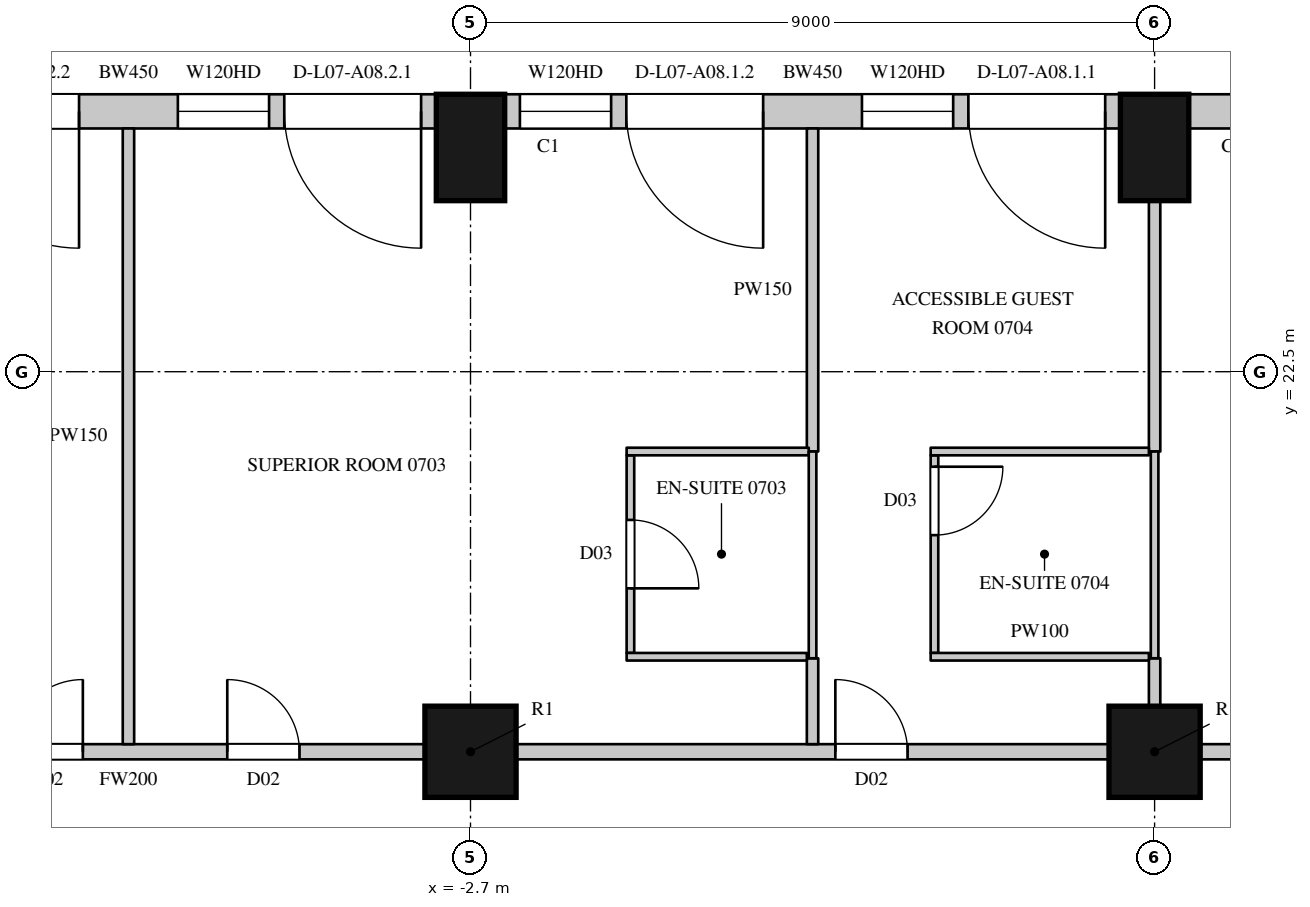
"""IFC4 building model, lengths in metres.
Left out: names, types, materials, properties, quantities, classifications, styles, units other than length and angle.
Written with IfcOpenShell. Run it as: python <this file> out.ifc"""

import sys

from ifc_helpers import new_model, si_unit, direction, frame, frame_2d, origin, origin_2d, place, context, subcontext, project, spatial, rectangle, circle, extrude, element, fill, save


model = new_model("IFC4")
c1 = context("Model", 3, precision=1e-05, world=origin(), true_north=direction((0.0, 1.0)))
c2 = subcontext(c1, "Body", "Model", "MODEL_VIEW")
j1 = project(units=[si_unit("LENGTHUNIT", "METRE"), si_unit("PLANEANGLEUNIT", "RADIAN")], contexts=[c1])
p1 = place(None, origin())
s1 = spatial("IfcSite", under=j1, at=p1, CompositionType="ELEMENT")
p2 = place(p1, origin())
s2 = spatial("IfcBuilding", under=s1, at=p2, CompositionType="ELEMENT")
p3 = place(p2, frame((0.0, 0.0, 55.5)))
s3 = spatial("IfcBuildingStorey", under=s2, at=p3, CompositionType="ELEMENT", Elevation=55.5)
for number, where, z_axis, x_axis in (
    (1, (6.3, 25.45, 0.0), (0.0, 0.0, 1.0), (-1.0, 0.0, 0.0)),
    (2, (-2.7, 25.45, 0.0), (0.0, 0.0, 1.0), (-1.0, 0.0, 0.0)),
):
    element("IfcColumn", number, at=place(p3, frame(where, z_axis=z_axis, x_axis=x_axis)), inside=s3, PredefinedType="COLUMN", context=c2, shape_type="SweptSolid", body=[
        extrude(rectangle(XDim=0.9, YDim=1.4, at=origin_2d()), origin(), (0.0, 0.0, 1.0), 3.6),
    ])
for number, where, z_axis, x_axis in (
    (3, (-2.7, 17.5, 0.0), (0.0, 0.0, 1.0), (1.0, 0.0, 0.0)),
    (4, (6.3, 17.5, 0.0), (0.0, 0.0, 1.0), (1.0, 0.0, 0.0)),
):
    element("IfcColumn", number, at=place(p3, frame(where, z_axis=z_axis, x_axis=x_axis)), inside=s3, PredefinedType="COLUMN", context=c2, shape_type="SweptSolid", body=[
        extrude(circle(Radius=0.6, at=origin_2d()), origin(), (0.0, 0.0, 1.0), 3.6),
    ])
p4 = place(p3, frame((11.989, 25.925, 0.0), z_axis=(0.0, 0.0, 1.0), x_axis=(-1.0, 0.0, 0.0)))
e5 = element("IfcWall", 5, at=p4, inside=s3, PredefinedType="SOLIDWALL", context=c2, shape_type="SweptSolid", body=[
    extrude(rectangle(XDim=5.239, YDim=0.45, at=frame_2d((2.619, 0.0))), origin(), (0.0, 0.0, 1.0), 3.3),
])
p5 = place(p4, frame((1.77, 0.0, 1.05)))
e6 = element("IfcOpeningElement", 6, at=p5, cuts=e5, PredefinedType="OPENING", context=c2, shape_type="SweptSolid", body=[
    extrude(rectangle(XDim=2.1, YDim=2.0, at=frame_2d((1.05, 1.0))), frame((0.0, 0.235, 0.0), z_axis=(0.0, -1.0, 0.0), x_axis=(1.0, 0.0, 0.0)), (0.0, 0.0, 1.0), 0.47),
])
p6 = place(p3, frame((5.85, 25.925, 0.0), z_axis=(0.0, 0.0, 1.0), x_axis=(-1.0, 0.0, 0.0)))
e7 = element("IfcWall", 7, at=p6, inside=s3, PredefinedType="SOLIDWALL", context=c2, shape_type="SweptSolid", body=[
    extrude(rectangle(XDim=8.1, YDim=0.45, at=frame_2d((4.05, 0.0))), origin(), (0.0, 0.0, 1.0), 3.3),
])
p7 = place(p6, frame((0.2, 0.0, 0.0)))
e8 = element("IfcOpeningElement", 8, at=p7, cuts=e7, PredefinedType="OPENING", context=c2, shape_type="SweptSolid", body=[
    extrude(rectangle(XDim=1.8, YDim=2.4, at=frame_2d((0.9, 1.2))), frame((0.0, 0.235, 0.0), z_axis=(0.0, -1.0, 0.0), x_axis=(1.0, 0.0, 0.0)), (0.0, 0.0, 1.0), 0.47),
])
p8 = place(p6, frame((2.2, 0.0, 1.05)))
e9 = element("IfcOpeningElement", 9, at=p8, cuts=e7, PredefinedType="OPENING", context=c2, shape_type="SweptSolid", body=[
    extrude(rectangle(XDim=1.2, YDim=2.0, at=frame_2d((0.6, 1.0))), frame((0.0, 0.235, 0.0), z_axis=(0.0, -1.0, 0.0), x_axis=(1.0, 0.0, 0.0)), (0.0, 0.0, 1.0), 0.47),
])
p9 = place(p6, frame((4.7, 0.0, 0.0)))
e10 = element("IfcOpeningElement", 10, at=p9, cuts=e7, PredefinedType="OPENING", context=c2, shape_type="SweptSolid", body=[
    extrude(rectangle(XDim=1.8, YDim=2.4, at=frame_2d((0.9, 1.2))), frame((0.0, 0.235, 0.0), z_axis=(0.0, -1.0, 0.0), x_axis=(1.0, 0.0, 0.0)), (0.0, 0.0, 1.0), 0.47),
])
p10 = place(p6, frame((6.7, 0.0, 1.05)))
e11 = element("IfcOpeningElement", 11, at=p10, cuts=e7, PredefinedType="OPENING", context=c2, shape_type="SweptSolid", body=[
    extrude(rectangle(XDim=1.2, YDim=2.0, at=frame_2d((0.6, 1.0))), frame((0.0, 0.235, 0.0), z_axis=(0.0, -1.0, 0.0), x_axis=(1.0, 0.0, 0.0)), (0.0, 0.0, 1.0), 0.47),
])
p11 = place(p3, frame((-3.15, 25.925, 0.0), z_axis=(0.0, 0.0, 1.0), x_axis=(-1.0, 0.0, 0.0)))
e12 = element("IfcWall", 12, at=p11, inside=s3, PredefinedType="SOLIDWALL", context=c2, shape_type="SweptSolid", body=[
    extrude(rectangle(XDim=8.1, YDim=0.45, at=frame_2d((4.05, 0.0))), origin(), (0.0, 0.0, 1.0), 3.3),
])
p12 = place(p11, frame((0.2, 0.0, 0.0)))
e13 = element("IfcOpeningElement", 13, at=p12, cuts=e12, PredefinedType="OPENING", context=c2, shape_type="SweptSolid", body=[
    extrude(rectangle(XDim=1.8, YDim=2.4, at=frame_2d((0.9, 1.2))), frame((0.0, 0.235, 0.0), z_axis=(0.0, -1.0, 0.0), x_axis=(1.0, 0.0, 0.0)), (0.0, 0.0, 1.0), 0.47),
])
p13 = place(p11, frame((2.2, 0.0, 1.05)))
e14 = element("IfcOpeningElement", 14, at=p13, cuts=e12, PredefinedType="OPENING", context=c2, shape_type="SweptSolid", body=[
    extrude(rectangle(XDim=1.2, YDim=2.0, at=frame_2d((0.6, 1.0))), frame((0.0, 0.235, 0.0), z_axis=(0.0, -1.0, 0.0), x_axis=(1.0, 0.0, 0.0)), (0.0, 0.0, 1.0), 0.47),
])
p14 = place(p11, frame((4.7, 0.0, 0.0)))
e15 = element("IfcOpeningElement", 15, at=p14, cuts=e12, PredefinedType="OPENING", context=c2, shape_type="SweptSolid", body=[
    extrude(rectangle(XDim=1.8, YDim=2.4, at=frame_2d((0.9, 1.2))), frame((0.0, 0.235, 0.0), z_axis=(0.0, -1.0, 0.0), x_axis=(1.0, 0.0, 0.0)), (0.0, 0.0, 1.0), 0.47),
])
p15 = place(p11, frame((6.7, 0.0, 1.05)))
e16 = element("IfcOpeningElement", 16, at=p15, cuts=e12, PredefinedType="OPENING", context=c2, shape_type="SweptSolid", body=[
    extrude(rectangle(XDim=1.2, YDim=2.0, at=frame_2d((0.6, 1.0))), frame((0.0, 0.235, 0.0), z_axis=(0.0, -1.0, 0.0), x_axis=(1.0, 0.0, 0.0)), (0.0, 0.0, 1.0), 0.47),
])
p16 = place(p3, frame((-11.1, 17.5, 0.0), z_axis=(0.0, 0.0, 1.0), x_axis=(1.0, 0.0, 0.0)))
e17 = element("IfcWall", 17, at=p16, inside=s3, PredefinedType="PARTITIONING", context=c2, shape_type="SweptSolid", body=[
    extrude(rectangle(XDim=7.8, YDim=0.2, at=frame_2d((3.9, 0.0))), origin(), (0.0, 0.0, 1.0), 2.75),
])
p17 = place(p16, frame((2.35, 0.0, 0.0)))
e18 = element("IfcOpeningElement", 18, at=p17, cuts=e17, PredefinedType="OPENING", context=c2, shape_type="SweptSolid", body=[
    extrude(rectangle(XDim=0.95, YDim=2.2, at=frame_2d((0.475, 1.1))), frame((0.0, 0.11, 0.0), z_axis=(0.0, -1.0, 0.0), x_axis=(1.0, 0.0, 0.0)), (0.0, 0.0, 1.0), 0.22),
])
p18 = place(p16, frame((5.2, 0.0, 0.0)))
e19 = element("IfcOpeningElement", 19, at=p18, cuts=e17, PredefinedType="OPENING", context=c2, shape_type="SweptSolid", body=[
    extrude(rectangle(XDim=0.95, YDim=2.2, at=frame_2d((0.475, 1.1))), frame((0.0, 0.11, 0.0), z_axis=(0.0, -1.0, 0.0), x_axis=(1.0, 0.0, 0.0)), (0.0, 0.0, 1.0), 0.22),
])
p19 = place(p3, frame((-2.1, 17.5, 0.0), z_axis=(0.0, 0.0, 1.0), x_axis=(1.0, 0.0, 0.0)))
e20 = element("IfcWall", 20, at=p19, inside=s3, PredefinedType="PARTITIONING", context=c2, shape_type="SweptSolid", body=[
    extrude(rectangle(XDim=7.8, YDim=0.2, at=frame_2d((3.9, 0.0))), origin(), (0.0, 0.0, 1.0), 2.75),
])
p20 = place(p19, frame((4.2, 0.0, 0.0)))
e21 = element("IfcOpeningElement", 21, at=p20, cuts=e20, PredefinedType="OPENING", context=c2, shape_type="SweptSolid", body=[
    extrude(rectangle(XDim=0.95, YDim=2.2, at=frame_2d((0.475, 1.1))), frame((0.0, 0.11, 0.0), z_axis=(0.0, -1.0, 0.0), x_axis=(1.0, 0.0, 0.0)), (0.0, 0.0, 1.0), 0.22),
])
p21 = place(p3, frame((6.9, 17.5, 0.0), z_axis=(0.0, 0.0, 1.0), x_axis=(1.0, 0.0, 0.0)))
e22 = element("IfcWall", 22, at=p21, inside=s3, PredefinedType="PARTITIONING", context=c2, shape_type="SweptSolid", body=[
    extrude(rectangle(XDim=7.8, YDim=0.2, at=frame_2d((3.9, 0.0))), origin(), (0.0, 0.0, 1.0), 2.75),
])
p22 = place(p21, frame((1.45, 0.0, 0.0)))
e23 = element("IfcOpeningElement", 23, at=p22, cuts=e22, PredefinedType="OPENING", context=c2, shape_type="SweptSolid", body=[
    extrude(rectangle(XDim=1.1, YDim=2.4, at=frame_2d((0.55, 1.2))), frame((0.0, 0.11, 0.0), z_axis=(0.0, -1.0, 0.0), x_axis=(1.0, 0.0, 0.0)), (0.0, 0.0, 1.0), 0.22),
])
p23 = place(p3, frame((-7.2, 17.6, 0.0), z_axis=(0.0, 0.0, 1.0), x_axis=(0.0, 1.0, 0.0)))
e24 = element("IfcWall", 24, at=p23, inside=s3, PredefinedType="PARTITIONING", context=c2, shape_type="SweptSolid", body=[
    extrude(rectangle(XDim=8.1, YDim=0.15, at=frame_2d((4.05, 0.0))), origin(), (0.0, 0.0, 1.0), 2.65),
])
p24 = place(p3, frame((1.8, 17.6, 0.0), z_axis=(0.0, 0.0, 1.0), x_axis=(0.0, 1.0, 0.0)))
e25 = element("IfcWall", 25, at=p24, inside=s3, PredefinedType="PARTITIONING", context=c2, shape_type="SweptSolid", body=[
    extrude(rectangle(XDim=1.13, YDim=0.15, at=frame_2d((0.565, 0.0))), origin(), (0.0, 0.0, 1.0), 2.65),
])
p25 = place(p3, frame((1.8, 21.45, 0.0), z_axis=(0.0, 0.0, 1.0), x_axis=(0.0, 1.0, 0.0)))
e26 = element("IfcWall", 26, at=p25, inside=s3, PredefinedType="PARTITIONING", context=c2, shape_type="SweptSolid", body=[
    extrude(rectangle(XDim=4.25, YDim=0.15, at=frame_2d((2.125, 0.0))), origin(), (0.0, 0.0, 1.0), 2.65),
])
p26 = place(p3, frame((6.3, 18.1, 0.0), z_axis=(0.0, 0.0, 1.0), x_axis=(0.0, 1.0, 0.0)))
e27 = element("IfcWall", 27, at=p26, inside=s3, PredefinedType="PARTITIONING", context=c2, shape_type="SweptSolid", body=[
    extrude(rectangle(XDim=0.63, YDim=0.15, at=frame_2d((0.315, 0.0))), origin(), (0.0, 0.0, 1.0), 2.75),
])
p27 = place(p3, frame((6.3, 21.45, 0.0), z_axis=(0.0, 0.0, 1.0), x_axis=(0.0, 1.0, 0.0)))
e28 = element("IfcWall", 28, at=p27, inside=s3, PredefinedType="PARTITIONING", context=c2, shape_type="SweptSolid", body=[
    extrude(rectangle(XDim=3.3, YDim=0.15, at=frame_2d((1.65, 0.0))), origin(), (0.0, 0.0, 1.0), 2.75),
])
p28 = place(p3, frame((-0.596, 18.8, 0.0), z_axis=(0.0, 0.0, 1.0), x_axis=(0.0, 1.0, 0.0)))
e29 = element("IfcWall", 29, at=p28, inside=s3, PredefinedType="PARTITIONING", context=c2, shape_type="SweptSolid", body=[
    extrude(rectangle(XDim=2.6, YDim=0.1, at=frame_2d((1.3, 0.0))), origin(), (0.0, 0.0, 1.0), 3.3),
])
p29 = place(p28, frame((0.85, 0.0, 0.0)))
e30 = element("IfcOpeningElement", 30, at=p29, cuts=e29, PredefinedType="OPENING", context=c2, shape_type="SweptSolid", body=[
    extrude(rectangle(XDim=0.9, YDim=2.2, at=frame_2d((0.45, 1.1))), frame((0.0, 0.06, 0.0), z_axis=(0.0, -1.0, 0.0), x_axis=(1.0, 0.0, 0.0)), (0.0, 0.0, 1.0), 0.12),
])
p30 = place(p3, frame((-0.646, 18.75, 0.0), z_axis=(0.0, 0.0, 1.0), x_axis=(1.0, 0.0, 0.0)))
e31 = element("IfcWall", 31, at=p30, inside=s3, PredefinedType="PARTITIONING", context=c2, shape_type="SweptSolid", body=[
    extrude(rectangle(XDim=2.371, YDim=0.1, at=frame_2d((1.186, 0.0))), origin(), (0.0, 0.0, 1.0), 3.3),
])
p31 = place(p3, frame((-0.646, 21.45, 0.0), z_axis=(0.0, 0.0, 1.0), x_axis=(1.0, 0.0, 0.0)))
e32 = element("IfcWall", 32, at=p31, inside=s3, PredefinedType="PARTITIONING", context=c2, shape_type="SweptSolid", body=[
    extrude(rectangle(XDim=2.396, YDim=0.1, at=frame_2d((1.198, 0.0))), origin(), (0.0, 0.0, 1.0), 3.3),
])
p32 = place(p3, frame((1.8, 18.73, 0.0), z_axis=(0.0, 0.0, 1.0), x_axis=(0.0, 1.0, 0.0)))
e33 = element("IfcWall", 33, at=p32, inside=s3, PredefinedType="PARTITIONING", context=c2, shape_type="SweptSolid", body=[
    extrude(rectangle(XDim=2.72, YDim=0.1, at=frame_2d((1.36, 0.0))), origin(), (0.0, 0.0, 1.0), 2.65),
])
p33 = place(p3, frame((3.404, 18.8, 0.0), z_axis=(0.0, 0.0, 1.0), x_axis=(0.0, 1.0, 0.0)))
e34 = element("IfcWall", 34, at=p33, inside=s3, PredefinedType="PARTITIONING", context=c2, shape_type="SweptSolid", body=[
    extrude(rectangle(XDim=2.6, YDim=0.1, at=frame_2d((1.3, 0.0))), origin(), (0.0, 0.0, 1.0), 3.3),
])
p34 = place(p33, frame((1.55, 0.0, 0.0)))
e35 = element("IfcOpeningElement", 35, at=p34, cuts=e34, PredefinedType="OPENING", context=c2, shape_type="SweptSolid", body=[
    extrude(rectangle(XDim=0.9, YDim=2.2, at=frame_2d((0.45, 1.1))), frame((0.0, 0.06, 0.0), z_axis=(0.0, -1.0, 0.0), x_axis=(1.0, 0.0, 0.0)), (0.0, 0.0, 1.0), 0.12),
])
for number, where, z_axis, x_axis in (
    (36, (3.354, 18.75, 0.0), (0.0, 0.0, 1.0), (1.0, 0.0, 0.0)),
    (37, (3.354, 21.45, 0.0), (0.0, 0.0, 1.0), (1.0, 0.0, 0.0)),
):
    element("IfcWall", number, at=place(p3, frame(where, z_axis=z_axis, x_axis=x_axis)), inside=s3, PredefinedType="PARTITIONING", context=c2, shape_type="SweptSolid", body=[
        extrude(rectangle(XDim=2.871, YDim=0.1, at=frame_2d((1.436, 0.0))), origin(), (0.0, 0.0, 1.0), 3.3),
    ])
p35 = place(p3, frame((6.3, 18.73, 0.0), z_axis=(0.0, 0.0, 1.0), x_axis=(0.0, 1.0, 0.0)))
e38 = element("IfcWall", 38, at=p35, inside=s3, PredefinedType="PARTITIONING", context=c2, shape_type="SweptSolid", body=[
    extrude(rectangle(XDim=2.72, YDim=0.1, at=frame_2d((1.36, 0.0))), origin(), (0.0, 0.0, 1.0), 2.75),
])
p36 = place(p7, origin())
e39 = element("IfcDoor", 39, at=p36, inside=s3, OperationType="SLIDING_TO_LEFT", PredefinedType="DOOR", context=c2, shape_type="SweptSolid", body=[
    extrude(rectangle(XDim=1.8, YDim=2.4, at=frame_2d((0.9, 1.2))), frame((0.0, 0.13, 0.0), z_axis=(0.0, -1.0, 0.0), x_axis=(1.0, 0.0, 0.0)), (0.0, 0.0, 1.0), 0.05),
])
fill(e8, e39)
p37 = place(p8, origin())
e40 = element("IfcWindow", 40, at=p37, inside=s3, PartitioningType="SINGLE_PANEL", PredefinedType="WINDOW", context=c2, shape_type="SweptSolid", body=[
    extrude(rectangle(XDim=1.2, YDim=2.0, at=frame_2d((0.6, 1.0))), frame((0.0, 0.135, 0.0), z_axis=(0.0, -1.0, 0.0), x_axis=(1.0, 0.0, 0.0)), (0.0, 0.0, 1.0), 0.06),
])
fill(e9, e40)
p38 = place(p9, origin())
e41 = element("IfcDoor", 41, at=p38, inside=s3, OperationType="SLIDING_TO_LEFT", PredefinedType="DOOR", context=c2, shape_type="SweptSolid", body=[
    extrude(rectangle(XDim=1.8, YDim=2.4, at=frame_2d((0.9, 1.2))), frame((0.0, 0.13, 0.0), z_axis=(0.0, -1.0, 0.0), x_axis=(1.0, 0.0, 0.0)), (0.0, 0.0, 1.0), 0.05),
])
fill(e10, e41)
p39 = place(p10, origin())
e42 = element("IfcWindow", 42, at=p39, inside=s3, PartitioningType="SINGLE_PANEL", PredefinedType="WINDOW", context=c2, shape_type="SweptSolid", body=[
    extrude(rectangle(XDim=1.2, YDim=2.0, at=frame_2d((0.6, 1.0))), frame((0.0, 0.135, 0.0), z_axis=(0.0, -1.0, 0.0), x_axis=(1.0, 0.0, 0.0)), (0.0, 0.0, 1.0), 0.06),
])
fill(e11, e42)
p40 = place(p12, origin())
e43 = element("IfcDoor", 43, at=p40, inside=s3, OperationType="SLIDING_TO_LEFT", PredefinedType="DOOR", context=c2, shape_type="SweptSolid", body=[
    extrude(rectangle(XDim=1.8, YDim=2.4, at=frame_2d((0.9, 1.2))), frame((0.0, 0.13, 0.0), z_axis=(0.0, -1.0, 0.0), x_axis=(1.0, 0.0, 0.0)), (0.0, 0.0, 1.0), 0.05),
])
fill(e13, e43)
p41 = place(p13, origin())
e44 = element("IfcWindow", 44, at=p41, inside=s3, PartitioningType="SINGLE_PANEL", PredefinedType="WINDOW", context=c2, shape_type="SweptSolid", body=[
    extrude(rectangle(XDim=1.2, YDim=2.0, at=frame_2d((0.6, 1.0))), frame((0.0, 0.135, 0.0), z_axis=(0.0, -1.0, 0.0), x_axis=(1.0, 0.0, 0.0)), (0.0, 0.0, 1.0), 0.06),
])
fill(e14, e44)
p42 = place(p14, origin())
e45 = element("IfcDoor", 45, at=p42, inside=s3, OperationType="SLIDING_TO_LEFT", PredefinedType="DOOR", context=c2, shape_type="SweptSolid", body=[
    extrude(rectangle(XDim=1.8, YDim=2.4, at=frame_2d((0.9, 1.2))), frame((0.0, 0.13, 0.0), z_axis=(0.0, -1.0, 0.0), x_axis=(1.0, 0.0, 0.0)), (0.0, 0.0, 1.0), 0.05),
])
fill(e15, e45)
p43 = place(p17, origin())
e46 = element("IfcDoor", 46, at=p43, inside=s3, OperationType="SINGLE_SWING_RIGHT", PredefinedType="DOOR", context=c2, shape_type="SweptSolid", body=[
    extrude(rectangle(XDim=0.95, YDim=2.2, at=frame_2d((0.475, 1.1))), frame((0.0, 0.025, 0.0), z_axis=(0.0, -1.0, 0.0), x_axis=(1.0, 0.0, 0.0)), (0.0, 0.0, 1.0), 0.05),
])
fill(e18, e46)
p44 = place(p18, origin())
e47 = element("IfcDoor", 47, at=p44, inside=s3, OperationType="SINGLE_SWING_LEFT", PredefinedType="DOOR", context=c2, shape_type="SweptSolid", body=[
    extrude(rectangle(XDim=0.95, YDim=2.2, at=frame_2d((0.475, 1.1))), frame((0.0, 0.025, 0.0), z_axis=(0.0, -1.0, 0.0), x_axis=(1.0, 0.0, 0.0)), (0.0, 0.0, 1.0), 0.05),
])
fill(e19, e47)
p45 = place(p29, origin())
e48 = element("IfcDoor", 48, at=p45, inside=s3, OperationType="SINGLE_SWING_RIGHT", PredefinedType="DOOR", context=c2, shape_type="SweptSolid", body=[
    extrude(rectangle(XDim=0.9, YDim=2.2, at=frame_2d((0.45, 1.1))), frame((0.0, 0.025, 0.0), z_axis=(0.0, -1.0, 0.0), x_axis=(1.0, 0.0, 0.0)), (0.0, 0.0, 1.0), 0.05),
])
fill(e30, e48)
p46 = place(p20, origin())
e49 = element("IfcDoor", 49, at=p46, inside=s3, OperationType="SINGLE_SWING_LEFT", PredefinedType="DOOR", context=c2, shape_type="SweptSolid", body=[
    extrude(rectangle(XDim=0.95, YDim=2.2, at=frame_2d((0.475, 1.1))), frame((0.0, 0.025, 0.0), z_axis=(0.0, -1.0, 0.0), x_axis=(1.0, 0.0, 0.0)), (0.0, 0.0, 1.0), 0.05),
])
fill(e21, e49)
p47 = place(p34, origin())
e50 = element("IfcDoor", 50, at=p47, inside=s3, OperationType="SINGLE_SWING_LEFT", PredefinedType="DOOR", context=c2, shape_type="SweptSolid", body=[
    extrude(rectangle(XDim=0.9, YDim=2.2, at=frame_2d((0.45, 1.1))), frame((0.0, 0.025, 0.0), z_axis=(0.0, -1.0, 0.0), x_axis=(1.0, 0.0, 0.0)), (0.0, 0.0, 1.0), 0.05),
])
fill(e35, e50)
save(model, sys.argv[1])
